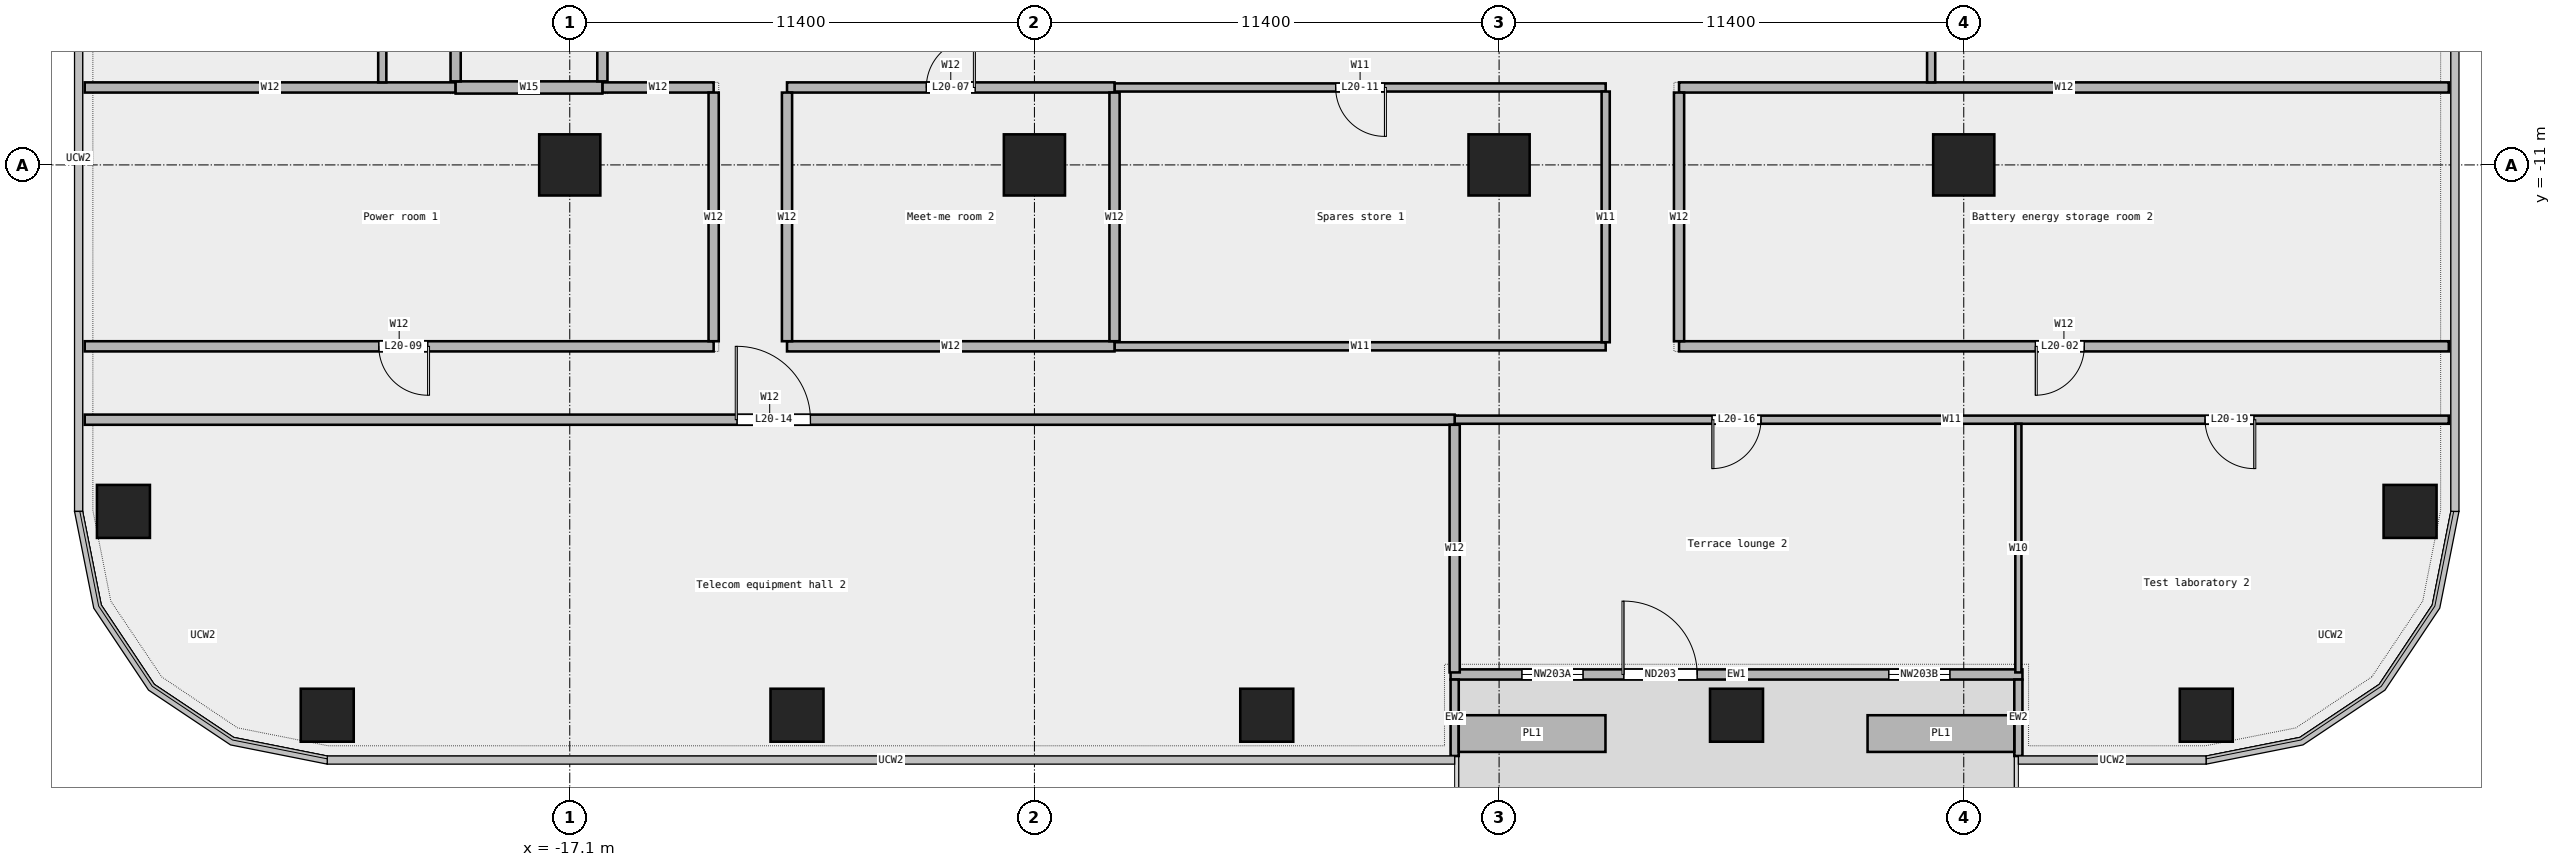
"""IFC4 building model, lengths in metres.
Left out: names, types, materials, properties, quantities, classifications, styles, units other than length and angle.
Written with IfcOpenShell. Run it as: python <this file> out.ifc"""

import sys

from ifc_helpers import new_model, si_unit, direction, frame, frame_2d, origin, origin_2d, place, context, subcontext, project, spatial, rectangle, extrude, element, fill, save


model = new_model("IFC4")
c1 = context("Model", 3, precision=1e-05, world=origin(), true_north=direction((0.0, 1.0)))
c2 = subcontext(c1, "Body", "Model", "MODEL_VIEW")
j1 = project(units=[si_unit("LENGTHUNIT", "METRE"), si_unit("PLANEANGLEUNIT", "RADIAN")], contexts=[c1])
p1 = place(None, origin())
s1 = spatial("IfcSite", under=j1, at=p1, CompositionType="ELEMENT")
p2 = place(p1, origin())
s2 = spatial("IfcBuilding", under=s1, at=p2, CompositionType="ELEMENT")
p3 = place(p2, frame((0.0, 0.0, 103.6)))
s3 = spatial("IfcBuildingStorey", under=s2, at=p3, CompositionType="ELEMENT", Elevation=103.6)
for number, where, z_axis, x_axis in (
    (1, (-23.05, -24.5, 0.0), (0.0, 0.0, 1.0), (1.0, 0.0, 0.0)),
    (2, (-11.525, -24.5, 0.0), (0.0, 0.0, 1.0), (1.0, 0.0, 0.0)),
    (3, (0.0, -24.5, 0.0), (0.0, 0.0, 1.0), (1.0, 0.0, 0.0)),
    (4, (11.525, -24.5, 0.0), (0.0, 0.0, 1.0), (1.0, 0.0, 0.0)),
    (5, (23.05, -24.5, 0.0), (0.0, 0.0, 1.0), (1.0, 0.0, 0.0)),
    (6, (28.05, -19.5, 0.0), (0.0, 0.0, 1.0), (1.0, 0.0, 0.0)),
    (7, (-28.05, -19.5, 0.0), (0.0, 0.0, 1.0), (1.0, 0.0, 0.0)),
):
    element("IfcColumn", number, at=place(p3, frame(where, z_axis=z_axis, x_axis=x_axis)), inside=s3, PredefinedType="COLUMN", context=c2, shape_type="SweptSolid", body=[
        extrude(rectangle(XDim=1.3, YDim=1.3, at=origin_2d()), origin(), (0.0, 0.0, 1.0), 4.05),
    ])
for number, where, z_axis, x_axis in (
    (8, (-17.1, -11.0, 0.0), (0.0, 0.0, 1.0), (1.0, 0.0, 0.0)),
    (9, (-5.7, -11.0, 0.0), (0.0, 0.0, 1.0), (1.0, 0.0, 0.0)),
    (10, (5.7, -11.0, 0.0), (0.0, 0.0, 1.0), (1.0, 0.0, 0.0)),
    (11, (17.1, -11.0, 0.0), (0.0, 0.0, 1.0), (1.0, 0.0, 0.0)),
):
    element("IfcColumn", number, at=place(p3, frame(where, z_axis=z_axis, x_axis=x_axis)), inside=s3, PredefinedType="COLUMN", context=c2, shape_type="SweptSolid", body=[
        extrude(rectangle(XDim=1.5, YDim=1.5, at=origin_2d()), origin(), (0.0, 0.0, 1.0), 4.05),
    ])
p4 = place(p3, frame((4.51, -23.5, 0.0), z_axis=(0.0, 0.0, 1.0), x_axis=(1.0, 0.0, 0.0)))
e12 = element("IfcWall", 12, at=p4, inside=s3, PredefinedType="STANDARD", context=c2, shape_type="SweptSolid", body=[
    extrude(rectangle(XDim=14.03, YDim=0.25, at=frame_2d((7.015, 0.0))), origin(), (0.0, 0.0, 1.0), 4.05),
])
p5 = place(p4, frame((1.75, 0.0, 0.45)))
e13 = element("IfcOpeningElement", 13, at=p5, cuts=e12, PredefinedType="OPENING", context=c2, shape_type="SweptSolid", body=[
    extrude(rectangle(XDim=1.5, YDim=3.0, at=frame_2d((0.75, 1.5))), frame((0.0, 0.137, 0.0), z_axis=(0.0, -1.0, 0.0), x_axis=(1.0, 0.0, 0.0)), (0.0, 0.0, 1.0), 0.274),
])
p6 = place(p4, frame((4.25, 0.0, 0.0)))
e14 = element("IfcOpeningElement", 14, at=p6, cuts=e12, PredefinedType="OPENING", context=c2, shape_type="SweptSolid", body=[
    extrude(rectangle(XDim=1.8, YDim=2.4, at=frame_2d((0.9, 1.2))), frame((0.0, 0.137, 0.0), z_axis=(0.0, -1.0, 0.0), x_axis=(1.0, 0.0, 0.0)), (0.0, 0.0, 1.0), 0.274),
])
p7 = place(p4, frame((10.75, 0.0, 0.45)))
e15 = element("IfcOpeningElement", 15, at=p7, cuts=e12, PredefinedType="OPENING", context=c2, shape_type="SweptSolid", body=[
    extrude(rectangle(XDim=1.5, YDim=3.0, at=frame_2d((0.75, 1.5))), frame((0.0, 0.137, 0.0), z_axis=(0.0, -1.0, 0.0), x_axis=(1.0, 0.0, 0.0)), (0.0, 0.0, 1.0), 0.274),
])
for number, where, z_axis, x_axis in (
    (16, (4.61, -25.5, 0.0), (0.0, 0.0, 1.0), (0.0, 1.0, 0.0)),
    (17, (18.44, -25.5, 0.0), (0.0, 0.0, 1.0), (0.0, 1.0, 0.0)),
):
    element("IfcWall", number, at=place(p3, frame(where, z_axis=z_axis, x_axis=x_axis)), inside=s3, PredefinedType="STANDARD", context=c2, shape_type="SweptSolid", body=[
        extrude(rectangle(XDim=1.875, YDim=0.2, at=frame_2d((0.938, 0.0))), origin(), (0.0, 0.0, 1.0), 4.05),
    ])
for number, where, z_axis, x_axis in (
    (18, (4.71, -24.95, 0.0), (0.0, 0.0, 1.0), (1.0, 0.0, 0.0)),
    (19, (14.74, -24.95, 0.0), (0.0, 0.0, 1.0), (1.0, 0.0, 0.0)),
):
    element("IfcWall", number, at=place(p3, frame(where, z_axis=z_axis, x_axis=x_axis)), inside=s3, PredefinedType="STANDARD", context=c2, shape_type="SweptSolid", body=[
        extrude(rectangle(XDim=3.6, YDim=0.9, at=frame_2d((1.8, 0.0))), origin(), (0.0, 0.0, 1.0), 0.7),
    ])
p8 = place(p3, frame((4.61, -17.25, 0.0), z_axis=(0.0, 0.0, 1.0), x_axis=(1.0, 0.0, 0.0)))
e20 = element("IfcWall", 20, at=p8, inside=s3, PredefinedType="PARTITIONING", context=c2, shape_type="SweptSolid", body=[
    extrude(rectangle(XDim=24.39, YDim=0.2, at=frame_2d((12.195, 0.0))), origin(), (0.0, 0.0, 1.0), 4.05),
])
p9 = place(p8, frame((6.315, 0.0, 0.0)))
e21 = element("IfcOpeningElement", 21, at=p9, cuts=e20, PredefinedType="OPENING", context=c2, shape_type="SweptSolid", body=[
    extrude(rectangle(XDim=1.2, YDim=2.1, at=frame_2d((0.6, 1.05))), frame((0.0, 0.112, 0.0), z_axis=(0.0, -1.0, 0.0), x_axis=(1.0, 0.0, 0.0)), (0.0, 0.0, 1.0), 0.224),
])
p10 = place(p8, frame((18.41, 0.0, 0.0)))
e22 = element("IfcOpeningElement", 22, at=p10, cuts=e20, PredefinedType="OPENING", context=c2, shape_type="SweptSolid", body=[
    extrude(rectangle(XDim=1.2, YDim=2.1, at=frame_2d((0.6, 1.05))), frame((0.0, 0.112, 0.0), z_axis=(0.0, -1.0, 0.0), x_axis=(1.0, 0.0, 0.0)), (0.0, 0.0, 1.0), 0.224),
])
p11 = place(p3, frame((-29.0, -17.25, 0.0), z_axis=(0.0, 0.0, 1.0), x_axis=(1.0, 0.0, 0.0)))
e23 = element("IfcWall", 23, at=p11, inside=s3, PredefinedType="PARTITIONING", context=c2, shape_type="SweptSolid", body=[
    extrude(rectangle(XDim=33.61, YDim=0.25, at=frame_2d((16.805, 0.0))), origin(), (0.0, 0.0, 1.0), 4.05),
])
p12 = place(p11, frame((16.005, 0.0, 0.0)))
e24 = element("IfcOpeningElement", 24, at=p12, cuts=e23, PredefinedType="OPENING", context=c2, shape_type="SweptSolid", body=[
    extrude(rectangle(XDim=1.8, YDim=2.1, at=frame_2d((0.9, 1.05))), frame((0.0, 0.137, 0.0), z_axis=(0.0, -1.0, 0.0), x_axis=(1.0, 0.0, 0.0)), (0.0, 0.0, 1.0), 0.274),
])
p13 = place(p3, frame((-3.735, -15.45, 0.0), z_axis=(0.0, 0.0, 1.0), x_axis=(1.0, 0.0, 0.0)))
e25 = element("IfcWall", 25, at=p13, inside=s3, PredefinedType="PARTITIONING", context=c2, shape_type="SweptSolid", body=[
    extrude(rectangle(XDim=12.05, YDim=0.2, at=frame_2d((6.025, 0.0))), origin(), (0.0, 0.0, 1.0), 4.05),
])
p14 = place(p3, frame((-29.0, -15.45, 0.0), z_axis=(0.0, 0.0, 1.0), x_axis=(1.0, 0.0, 0.0)))
e26 = element("IfcWall", 26, at=p14, inside=s3, PredefinedType="PARTITIONING", context=c2, shape_type="SweptSolid", body=[
    extrude(rectangle(XDim=15.43, YDim=0.25, at=frame_2d((7.715, 0.0))), origin(), (0.0, 0.0, 1.0), 4.05),
])
p15 = place(p14, frame((7.215, 0.0, 0.0)))
e27 = element("IfcOpeningElement", 27, at=p15, cuts=e26, PredefinedType="OPENING", context=c2, shape_type="SweptSolid", body=[
    extrude(rectangle(XDim=1.2, YDim=2.1, at=frame_2d((0.6, 1.05))), frame((0.0, 0.137, 0.0), z_axis=(0.0, -1.0, 0.0), x_axis=(1.0, 0.0, 0.0)), (0.0, 0.0, 1.0), 0.274),
])
p16 = place(p3, frame((-11.77, -15.45, 0.0), z_axis=(0.0, 0.0, 1.0), x_axis=(1.0, 0.0, 0.0)))
e28 = element("IfcWall", 28, at=p16, inside=s3, PredefinedType="PARTITIONING", context=c2, shape_type="SweptSolid", body=[
    extrude(rectangle(XDim=8.035, YDim=0.25, at=frame_2d((4.018, 0.0))), origin(), (0.0, 0.0, 1.0), 4.05),
])
p17 = place(p3, frame((10.115, -15.45, 0.0), z_axis=(0.0, 0.0, 1.0), x_axis=(1.0, 0.0, 0.0)))
e29 = element("IfcWall", 29, at=p17, inside=s3, PredefinedType="PARTITIONING", context=c2, shape_type="SweptSolid", body=[
    extrude(rectangle(XDim=18.885, YDim=0.25, at=frame_2d((9.442, 0.0))), origin(), (0.0, 0.0, 1.0), 4.05),
])
p18 = place(p17, frame((8.742, 0.0, 0.0)))
e30 = element("IfcOpeningElement", 30, at=p18, cuts=e29, PredefinedType="OPENING", context=c2, shape_type="SweptSolid", body=[
    extrude(rectangle(XDim=1.2, YDim=2.1, at=frame_2d((0.6, 1.05))), frame((0.0, 0.137, 0.0), z_axis=(0.0, -1.0, 0.0), x_axis=(1.0, 0.0, 0.0)), (0.0, 0.0, 1.0), 0.274),
])
p19 = place(p3, frame((-3.735, -9.1, 0.0), z_axis=(0.0, 0.0, 1.0), x_axis=(1.0, 0.0, 0.0)))
e31 = element("IfcWall", 31, at=p19, inside=s3, PredefinedType="PARTITIONING", context=c2, shape_type="SweptSolid", body=[
    extrude(rectangle(XDim=12.05, YDim=0.2, at=frame_2d((6.025, 0.0))), origin(), (0.0, 0.0, 1.0), 4.05),
])
p20 = place(p19, frame((5.425, 0.0, 0.0)))
e32 = element("IfcOpeningElement", 32, at=p20, cuts=e31, PredefinedType="OPENING", context=c2, shape_type="SweptSolid", body=[
    extrude(rectangle(XDim=1.2, YDim=2.1, at=frame_2d((0.6, 1.05))), frame((0.0, 0.112, 0.0), z_axis=(0.0, -1.0, 0.0), x_axis=(1.0, 0.0, 0.0)), (0.0, 0.0, 1.0), 0.224),
])
p21 = place(p3, frame((-29.0, -9.1, 0.0), z_axis=(0.0, 0.0, 1.0), x_axis=(1.0, 0.0, 0.0)))
e33 = element("IfcWall", 33, at=p21, inside=s3, PredefinedType="PARTITIONING", context=c2, shape_type="SweptSolid", body=[
    extrude(rectangle(XDim=9.1, YDim=0.25, at=frame_2d((4.55, 0.0))), origin(), (0.0, 0.0, 1.0), 4.05),
])
p22 = place(p3, frame((-16.3, -9.1, 0.0), z_axis=(0.0, 0.0, 1.0), x_axis=(1.0, 0.0, 0.0)))
e34 = element("IfcWall", 34, at=p22, inside=s3, PredefinedType="PARTITIONING", context=c2, shape_type="SweptSolid", body=[
    extrude(rectangle(XDim=2.73, YDim=0.25, at=frame_2d((1.365, 0.0))), origin(), (0.0, 0.0, 1.0), 4.05),
])
p23 = place(p3, frame((-11.77, -9.1, 0.0), z_axis=(0.0, 0.0, 1.0), x_axis=(1.0, 0.0, 0.0)))
e35 = element("IfcWall", 35, at=p23, inside=s3, PredefinedType="PARTITIONING", context=c2, shape_type="SweptSolid", body=[
    extrude(rectangle(XDim=8.035, YDim=0.25, at=frame_2d((4.018, 0.0))), origin(), (0.0, 0.0, 1.0), 4.05),
])
p24 = place(p23, frame((3.417, 0.0, 0.0)))
e36 = element("IfcOpeningElement", 36, at=p24, cuts=e35, PredefinedType="OPENING", context=c2, shape_type="SweptSolid", body=[
    extrude(rectangle(XDim=1.2, YDim=2.1, at=frame_2d((0.6, 1.05))), frame((0.0, 0.137, 0.0), z_axis=(0.0, -1.0, 0.0), x_axis=(1.0, 0.0, 0.0)), (0.0, 0.0, 1.0), 0.274),
])
p25 = place(p3, frame((10.115, -9.1, 0.0), z_axis=(0.0, 0.0, 1.0), x_axis=(1.0, 0.0, 0.0)))
e37 = element("IfcWall", 37, at=p25, inside=s3, PredefinedType="PARTITIONING", context=c2, shape_type="SweptSolid", body=[
    extrude(rectangle(XDim=18.885, YDim=0.25, at=frame_2d((9.442, 0.0))), origin(), (0.0, 0.0, 1.0), 4.05),
])
p26 = place(p3, frame((-19.9, -9.1, 0.0), z_axis=(0.0, 0.0, 1.0), x_axis=(1.0, 0.0, 0.0)))
e38 = element("IfcWall", 38, at=p26, inside=s3, PredefinedType="PARTITIONING", context=c2, shape_type="SweptSolid", body=[
    extrude(rectangle(XDim=3.6, YDim=0.3, at=frame_2d((1.8, 0.0))), origin(), (0.0, 0.0, 1.0), 4.05),
])
p27 = place(p3, frame((-21.7, -8.975, 0.0), z_axis=(0.0, 0.0, 1.0), x_axis=(0.0, 1.0, 0.0)))
e39 = element("IfcWall", 39, at=p27, inside=s3, PredefinedType="PARTITIONING", context=c2, shape_type="SweptSolid", body=[
    extrude(rectangle(XDim=19.685, YDim=0.2, at=frame_2d((9.843, 0.0))), origin(), (0.0, 0.0, 1.0), 4.05),
])
p28 = place(p27, frame((2.805, 0.0, 0.0)))
e40 = element("IfcOpeningElement", 40, at=p28, cuts=e39, PredefinedType="OPENING", context=c2, shape_type="SweptSolid", body=[
    extrude(rectangle(XDim=1.2, YDim=2.1, at=frame_2d((0.6, 1.05))), frame((0.0, 0.112, 0.0), z_axis=(0.0, -1.0, 0.0), x_axis=(1.0, 0.0, 0.0)), (0.0, 0.0, 1.0), 0.224),
])
p29 = place(p27, frame((12.647, 0.0, 0.0)))
e41 = element("IfcOpeningElement", 41, at=p29, cuts=e39, PredefinedType="OPENING", context=c2, shape_type="SweptSolid", body=[
    extrude(rectangle(XDim=1.2, YDim=2.1, at=frame_2d((0.6, 1.05))), frame((0.0, 0.112, 0.0), z_axis=(0.0, -1.0, 0.0), x_axis=(1.0, 0.0, 0.0)), (0.0, 0.0, 1.0), 0.224),
])
p30 = place(p3, frame((-19.9, -8.95, 0.0), z_axis=(0.0, 0.0, 1.0), x_axis=(0.0, 1.0, 0.0)))
e42 = element("IfcWall", 42, at=p30, inside=s3, PredefinedType="PARTITIONING", context=c2, shape_type="SweptSolid", body=[
    extrude(rectangle(XDim=11.075, YDim=0.25, at=frame_2d((5.538, 0.0))), origin(), (0.0, 0.0, 1.0), 4.05),
])
p31 = place(p3, frame((-16.3, -8.95, 0.0), z_axis=(0.0, 0.0, 1.0), x_axis=(0.0, 1.0, 0.0)))
e43 = element("IfcWall", 43, at=p31, inside=s3, PredefinedType="PARTITIONING", context=c2, shape_type="SweptSolid", body=[
    extrude(rectangle(XDim=8.2, YDim=0.25, at=frame_2d((4.1, 0.0))), origin(), (0.0, 0.0, 1.0), 4.05),
])
p32 = place(p31, frame((3.65, 0.0, 0.0)))
e44 = element("IfcOpeningElement", 44, at=p32, cuts=e43, PredefinedType="OPENING", context=c2, shape_type="SweptSolid", body=[
    extrude(rectangle(XDim=0.9, YDim=2.1, at=frame_2d((0.45, 1.05))), frame((0.0, 0.137, 0.0), z_axis=(0.0, -1.0, 0.0), x_axis=(1.0, 0.0, 0.0)), (0.0, 0.0, 1.0), 0.274),
])
for number, where, z_axis, x_axis in (
    (45, (-13.57, -15.325, 0.0), (0.0, 0.0, 1.0), (0.0, 1.0, 0.0)),
    (46, (-11.77, -15.325, 0.0), (0.0, 0.0, 1.0), (0.0, 1.0, 0.0)),
    (47, (-3.735, -15.325, 0.0), (0.0, 0.0, 1.0), (0.0, 1.0, 0.0)),
):
    element("IfcWall", number, at=place(p3, frame(where, z_axis=z_axis, x_axis=x_axis)), inside=s3, PredefinedType="PARTITIONING", context=c2, shape_type="SweptSolid", body=[
        extrude(rectangle(XDim=6.1, YDim=0.25, at=frame_2d((3.05, 0.0))), origin(), (0.0, 0.0, 1.0), 4.05),
    ])
p33 = place(p3, frame((4.61, -23.45, 0.0), z_axis=(0.0, 0.0, 1.0), x_axis=(0.0, 1.0, 0.0)))
e48 = element("IfcWall", 48, at=p33, inside=s3, PredefinedType="PARTITIONING", context=c2, shape_type="SweptSolid", body=[
    extrude(rectangle(XDim=6.075, YDim=0.25, at=frame_2d((3.038, 0.0))), origin(), (0.0, 0.0, 1.0), 4.05),
])
p34 = place(p3, frame((8.315, -15.35, 0.0), z_axis=(0.0, 0.0, 1.0), x_axis=(0.0, 1.0, 0.0)))
e49 = element("IfcWall", 49, at=p34, inside=s3, PredefinedType="PARTITIONING", context=c2, shape_type="SweptSolid", body=[
    extrude(rectangle(XDim=6.15, YDim=0.2, at=frame_2d((3.075, 0.0))), origin(), (0.0, 0.0, 1.0), 4.05),
])
p35 = place(p3, frame((10.115, -15.325, 0.0), z_axis=(0.0, 0.0, 1.0), x_axis=(0.0, 1.0, 0.0)))
e50 = element("IfcWall", 50, at=p35, inside=s3, PredefinedType="PARTITIONING", context=c2, shape_type="SweptSolid", body=[
    extrude(rectangle(XDim=6.1, YDim=0.25, at=frame_2d((3.05, 0.0))), origin(), (0.0, 0.0, 1.0), 4.05),
])
p36 = place(p3, frame((16.3, -8.975, 0.0), z_axis=(0.0, 0.0, 1.0), x_axis=(0.0, 1.0, 0.0)))
e51 = element("IfcWall", 51, at=p36, inside=s3, PredefinedType="PARTITIONING", context=c2, shape_type="SweptSolid", body=[
    extrude(rectangle(XDim=8.225, YDim=0.2, at=frame_2d((4.113, 0.0))), origin(), (0.0, 0.0, 1.0), 4.05),
])
p37 = place(p36, frame((3.363, 0.0, 0.0)))
e52 = element("IfcOpeningElement", 52, at=p37, cuts=e51, PredefinedType="OPENING", context=c2, shape_type="SweptSolid", body=[
    extrude(rectangle(XDim=1.5, YDim=2.1, at=frame_2d((0.75, 1.05))), frame((0.0, 0.112, 0.0), z_axis=(0.0, -1.0, 0.0), x_axis=(1.0, 0.0, 0.0)), (0.0, 0.0, 1.0), 0.224),
])
p38 = place(p3, frame((18.44, -23.45, 0.0), z_axis=(0.0, 0.0, 1.0), x_axis=(0.0, 1.0, 0.0)))
e53 = element("IfcWall", 53, at=p38, inside=s3, PredefinedType="PARTITIONING", context=c2, shape_type="SweptSolid", body=[
    extrude(rectangle(XDim=6.1, YDim=0.15, at=frame_2d((3.05, 0.0))), origin(), (0.0, 0.0, 1.0), 4.05),
])
p39 = place(p5, origin())
e54 = element("IfcWindow", 54, at=p39, inside=s3, PartitioningType="SINGLE_PANEL", PredefinedType="WINDOW", context=c2, shape_type="SweptSolid", body=[
    extrude(rectangle(XDim=1.5, YDim=3.0, at=frame_2d((0.75, 1.5))), frame((0.0, 0.03, 0.0), z_axis=(0.0, -1.0, 0.0), x_axis=(1.0, 0.0, 0.0)), (0.0, 0.0, 1.0), 0.06),
])
fill(e13, e54)
p40 = place(p6, origin())
e55 = element("IfcDoor", 55, at=p40, inside=s3, OperationType="DOUBLE_DOOR_SINGLE_SWING", PredefinedType="DOOR", context=c2, shape_type="SweptSolid", body=[
    extrude(rectangle(XDim=1.8, YDim=2.4, at=frame_2d((0.9, 1.2))), frame((0.0, 0.025, 0.0), z_axis=(0.0, -1.0, 0.0), x_axis=(1.0, 0.0, 0.0)), (0.0, 0.0, 1.0), 0.05),
])
fill(e14, e55)
p41 = place(p7, origin())
e56 = element("IfcWindow", 56, at=p41, inside=s3, PartitioningType="SINGLE_PANEL", PredefinedType="WINDOW", context=c2, shape_type="SweptSolid", body=[
    extrude(rectangle(XDim=1.5, YDim=3.0, at=frame_2d((0.75, 1.5))), frame((0.0, 0.03, 0.0), z_axis=(0.0, -1.0, 0.0), x_axis=(1.0, 0.0, 0.0)), (0.0, 0.0, 1.0), 0.06),
])
fill(e15, e56)
p42 = place(p18, origin())
e57 = element("IfcDoor", 57, at=p42, inside=s3, OperationType="SINGLE_SWING_RIGHT", PredefinedType="DOOR", context=c2, shape_type="SweptSolid", body=[
    extrude(rectangle(XDim=1.2, YDim=2.1, at=frame_2d((0.6, 1.05))), frame((0.0, 0.025, 0.0), z_axis=(0.0, -1.0, 0.0), x_axis=(1.0, 0.0, 0.0)), (0.0, 0.0, 1.0), 0.05),
])
fill(e30, e57)
p43 = place(p24, origin())
e58 = element("IfcDoor", 58, at=p43, inside=s3, OperationType="SINGLE_SWING_RIGHT", PredefinedType="DOOR", context=c2, shape_type="SweptSolid", body=[
    extrude(rectangle(XDim=1.2, YDim=2.1, at=frame_2d((0.6, 1.05))), frame((0.0, 0.025, 0.0), z_axis=(0.0, -1.0, 0.0), x_axis=(1.0, 0.0, 0.0)), (0.0, 0.0, 1.0), 0.05),
])
fill(e36, e58)
p44 = place(p15, origin())
e59 = element("IfcDoor", 59, at=p44, inside=s3, OperationType="SINGLE_SWING_LEFT", PredefinedType="DOOR", context=c2, shape_type="SweptSolid", body=[
    extrude(rectangle(XDim=1.2, YDim=2.1, at=frame_2d((0.6, 1.05))), frame((0.0, 0.025, 0.0), z_axis=(0.0, -1.0, 0.0), x_axis=(1.0, 0.0, 0.0)), (0.0, 0.0, 1.0), 0.05),
])
fill(e27, e59)
p45 = place(p20, origin())
e60 = element("IfcDoor", 60, at=p45, inside=s3, OperationType="SINGLE_SWING_LEFT", PredefinedType="DOOR", context=c2, shape_type="SweptSolid", body=[
    extrude(rectangle(XDim=1.2, YDim=2.1, at=frame_2d((0.6, 1.05))), frame((0.0, 0.025, 0.0), z_axis=(0.0, -1.0, 0.0), x_axis=(1.0, 0.0, 0.0)), (0.0, 0.0, 1.0), 0.05),
])
fill(e32, e60)
p46 = place(p12, origin())
e61 = element("IfcDoor", 61, at=p46, inside=s3, OperationType="DOUBLE_DOOR_SINGLE_SWING", PredefinedType="DOOR", context=c2, shape_type="SweptSolid", body=[
    extrude(rectangle(XDim=1.8, YDim=2.1, at=frame_2d((0.9, 1.05))), frame((0.0, 0.025, 0.0), z_axis=(0.0, -1.0, 0.0), x_axis=(1.0, 0.0, 0.0)), (0.0, 0.0, 1.0), 0.05),
])
fill(e24, e61)
p47 = place(p9, origin())
e62 = element("IfcDoor", 62, at=p47, inside=s3, OperationType="SINGLE_SWING_RIGHT", PredefinedType="DOOR", context=c2, shape_type="SweptSolid", body=[
    extrude(rectangle(XDim=1.2, YDim=2.1, at=frame_2d((0.6, 1.05))), frame((0.0, 0.025, 0.0), z_axis=(0.0, -1.0, 0.0), x_axis=(1.0, 0.0, 0.0)), (0.0, 0.0, 1.0), 0.05),
])
fill(e21, e62)
p48 = place(p10, origin())
e63 = element("IfcDoor", 63, at=p48, inside=s3, OperationType="SINGLE_SWING_LEFT", PredefinedType="DOOR", context=c2, shape_type="SweptSolid", body=[
    extrude(rectangle(XDim=1.2, YDim=2.1, at=frame_2d((0.6, 1.05))), frame((0.0, 0.025, 0.0), z_axis=(0.0, -1.0, 0.0), x_axis=(1.0, 0.0, 0.0)), (0.0, 0.0, 1.0), 0.05),
])
fill(e22, e63)
save(model, sys.argv[1])
